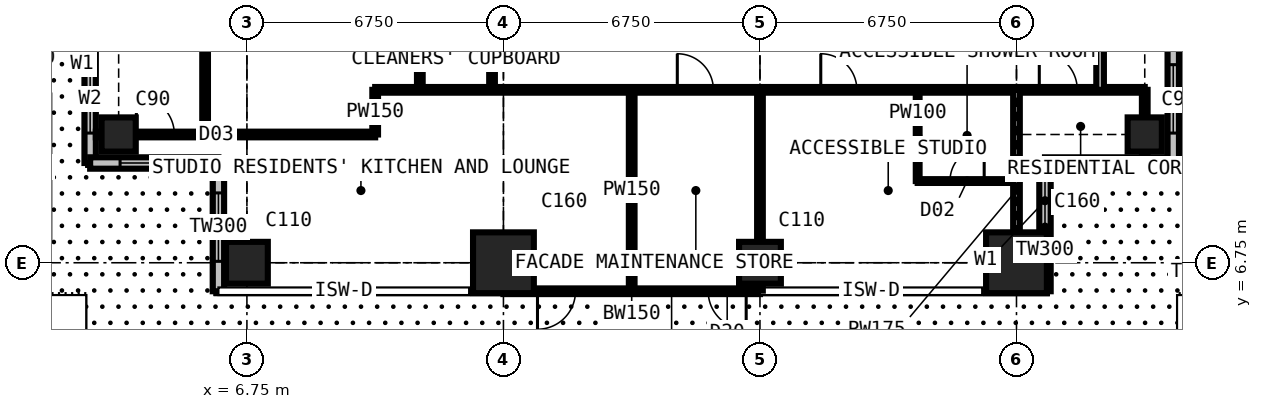
"""IFC4 building model, lengths in metres.
Left out: names, types, materials, properties, quantities, classifications, styles, units other than length and angle.
Written with IfcOpenShell. Run it as: python <this file> out.ifc"""

import sys

from ifc_helpers import new_model, si_unit, direction, frame, frame_2d, origin, origin_2d, place, context, subcontext, project, spatial, rectangle, extrude, element, fill, save


model = new_model("IFC4")
c1 = context("Model", 3, precision=1e-05, world=origin(), true_north=direction((0.0, 1.0)))
c2 = subcontext(c1, "Body", "Model", "MODEL_VIEW")
j1 = project(units=[si_unit("LENGTHUNIT", "METRE"), si_unit("PLANEANGLEUNIT", "RADIAN")], contexts=[c1])
p1 = place(None, origin())
s1 = spatial("IfcSite", under=j1, at=p1, CompositionType="ELEMENT")
p2 = place(p1, origin())
s2 = spatial("IfcBuilding", under=s1, at=p2, CompositionType="ELEMENT")
p3 = place(p2, frame((0.0, 0.0, 204.3)))
s3 = spatial("IfcBuildingStorey", under=s2, at=p3, CompositionType="ELEMENT", Elevation=204.3)
p4 = place(p3, frame((3.375, 10.125, 0.0), z_axis=(0.0, 0.0, 1.0), x_axis=(1.0, 0.0, 0.0)))
e1 = element("IfcColumn", 1, at=p4, inside=s3, PredefinedType="COLUMN", context=c2, shape_type="SweptSolid", body=[
    extrude(rectangle(XDim=0.9, YDim=0.9, at=origin_2d()), origin(), (0.0, 0.0, 1.0), 3.6),
])
p5 = place(p3, frame((6.75, 6.75, 0.0), z_axis=(0.0, 0.0, 1.0), x_axis=(1.0, 0.0, 0.0)))
e2 = element("IfcColumn", 2, at=p5, inside=s3, PredefinedType="COLUMN", context=c2, shape_type="SweptSolid", body=[
    extrude(rectangle(XDim=1.1, YDim=1.1, at=origin_2d()), origin(), (0.0, 0.0, 1.0), 3.6),
])
p6 = place(p3, frame((13.5, 6.75, 0.0), z_axis=(0.0, 0.0, 1.0), x_axis=(1.0, 0.0, 0.0)))
e3 = element("IfcColumn", 3, at=p6, inside=s3, PredefinedType="COLUMN", context=c2, shape_type="SweptSolid", body=[
    extrude(rectangle(XDim=1.6, YDim=1.6, at=origin_2d()), origin(), (0.0, 0.0, 1.0), 3.6),
])
p7 = place(p3, frame((20.25, 6.75, 0.0), z_axis=(0.0, 0.0, 1.0), x_axis=(1.0, 0.0, 0.0)))
e4 = element("IfcColumn", 4, at=p7, inside=s3, PredefinedType="COLUMN", context=c2, shape_type="SweptSolid", body=[
    extrude(rectangle(XDim=1.1, YDim=1.1, at=origin_2d()), origin(), (0.0, 0.0, 1.0), 3.6),
])
p8 = place(p3, frame((27.0, 6.75, 0.0), z_axis=(0.0, 0.0, 1.0), x_axis=(1.0, 0.0, 0.0)))
e5 = element("IfcColumn", 5, at=p8, inside=s3, PredefinedType="COLUMN", context=c2, shape_type="SweptSolid", body=[
    extrude(rectangle(XDim=1.6, YDim=1.6, at=origin_2d()), origin(), (0.0, 0.0, 1.0), 3.6),
])
p9 = place(p3, frame((30.375, 10.125, 0.0), z_axis=(0.0, 0.0, 1.0), x_axis=(1.0, 0.0, 0.0)))
e6 = element("IfcColumn", 6, at=p9, inside=s3, PredefinedType="COLUMN", context=c2, shape_type="SweptSolid", body=[
    extrude(rectangle(XDim=0.9, YDim=0.9, at=origin_2d()), origin(), (0.0, 0.0, 1.0), 3.6),
])
p10 = place(p3, frame((2.625, 12.75, 0.0), z_axis=(0.0, 0.0, 1.0), x_axis=(0.0, -1.0, 0.0)))
e7 = element("IfcWall", 7, at=p10, inside=s3, PredefinedType="SOLIDWALL", context=c2, shape_type="SweptSolid", body=[
    extrude(rectangle(XDim=3.375, YDim=0.3, at=frame_2d((1.688, 0.0))), origin(), (0.0, 0.0, 1.0), 3.375),
])
p11 = place(p10, frame((0.788, 0.0, 0.6)))
e8 = element("IfcOpeningElement", 8, at=p11, cuts=e7, PredefinedType="OPENING", context=c2, shape_type="SweptSolid", body=[
    extrude(rectangle(XDim=1.8, YDim=2.1, at=frame_2d((0.9, 1.05))), frame((0.0, 0.16, 0.0), z_axis=(0.0, -1.0, 0.0), x_axis=(1.0, 0.0, 0.0)), (0.0, 0.0, 1.0), 0.32),
])
p12 = place(p3, frame((2.625, 9.375, 0.0), z_axis=(0.0, 0.0, 1.0), x_axis=(1.0, 0.0, 0.0)))
e9 = element("IfcWall", 9, at=p12, inside=s3, PredefinedType="SOLIDWALL", context=c2, shape_type="SweptSolid", body=[
    extrude(rectangle(XDim=3.375, YDim=0.3, at=frame_2d((1.688, 0.0))), origin(), (0.0, 0.0, 1.0), 3.375),
])
p13 = place(p12, frame((0.788, 0.0, 0.6)))
e10 = element("IfcOpeningElement", 10, at=p13, cuts=e9, PredefinedType="OPENING", context=c2, shape_type="SweptSolid", body=[
    extrude(rectangle(XDim=1.8, YDim=2.1, at=frame_2d((0.9, 1.05))), frame((0.0, 0.16, 0.0), z_axis=(0.0, -1.0, 0.0), x_axis=(1.0, 0.0, 0.0)), (0.0, 0.0, 1.0), 0.32),
])
p14 = place(p3, frame((6.0, 9.375, 0.0), z_axis=(0.0, 0.0, 1.0), x_axis=(0.0, -1.0, 0.0)))
e11 = element("IfcWall", 11, at=p14, inside=s3, PredefinedType="SOLIDWALL", context=c2, shape_type="SweptSolid", body=[
    extrude(rectangle(XDim=3.375, YDim=0.3, at=frame_2d((1.688, 0.0))), origin(), (0.0, 0.0, 1.0), 3.375),
])
p15 = place(p14, frame((0.788, 0.0, 0.6)))
e12 = element("IfcOpeningElement", 12, at=p15, cuts=e11, PredefinedType="OPENING", context=c2, shape_type="SweptSolid", body=[
    extrude(rectangle(XDim=1.8, YDim=2.1, at=frame_2d((0.9, 1.05))), frame((0.0, 0.16, 0.0), z_axis=(0.0, -1.0, 0.0), x_axis=(1.0, 0.0, 0.0)), (0.0, 0.0, 1.0), 0.32),
])
p16 = place(p3, frame((20.25, 6.0, 0.0), z_axis=(0.0, 0.0, 1.0), x_axis=(-1.0, 0.0, 0.0)))
e13 = element("IfcWall", 13, at=p16, inside=s3, PredefinedType="SOLIDWALL", context=c2, shape_type="SweptSolid", body=[
    extrude(rectangle(XDim=6.75, YDim=0.15, at=frame_2d((3.375, 0.0))), origin(), (0.0, 0.0, 1.0), 3.375),
])
p17 = place(p16, frame((0.363, 0.0, 0.0)))
e14 = element("IfcOpeningElement", 14, at=p17, cuts=e13, PredefinedType="OPENING", context=c2, shape_type="SweptSolid", body=[
    extrude(rectangle(XDim=1.0, YDim=2.2, at=frame_2d((0.5, 1.1))), frame((0.0, 0.085, 0.0), z_axis=(0.0, -1.0, 0.0), x_axis=(1.0, 0.0, 0.0)), (0.0, 0.0, 1.0), 0.17),
])
p18 = place(p16, frame((1.725, 0.0, 0.9)))
e15 = element("IfcOpeningElement", 15, at=p18, cuts=e13, PredefinedType="OPENING", context=c2, shape_type="SweptSolid", body=[
    extrude(rectangle(XDim=1.2, YDim=1.8, at=frame_2d((0.6, 0.9))), frame((0.0, 0.085, 0.0), z_axis=(0.0, -1.0, 0.0), x_axis=(1.0, 0.0, 0.0)), (0.0, 0.0, 1.0), 0.17),
])
p19 = place(p16, frame((4.854, 0.0, 0.0)))
e16 = element("IfcOpeningElement", 16, at=p19, cuts=e13, PredefinedType="OPENING", context=c2, shape_type="SweptSolid", body=[
    extrude(rectangle(XDim=1.0, YDim=2.2, at=frame_2d((0.5, 1.1))), frame((0.0, 0.085, 0.0), z_axis=(0.0, -1.0, 0.0), x_axis=(1.0, 0.0, 0.0)), (0.0, 0.0, 1.0), 0.17),
])
p20 = place(p16, frame((3.558, 0.0, 0.9)))
e17 = element("IfcOpeningElement", 17, at=p20, cuts=e13, PredefinedType="OPENING", context=c2, shape_type="SweptSolid", body=[
    extrude(rectangle(XDim=1.2, YDim=1.8, at=frame_2d((0.6, 0.9))), frame((0.0, 0.085, 0.0), z_axis=(0.0, -1.0, 0.0), x_axis=(1.0, 0.0, 0.0)), (0.0, 0.0, 1.0), 0.17),
])
p21 = place(p3, frame((27.75, 6.0, 0.0), z_axis=(0.0, 0.0, 1.0), x_axis=(0.0, 1.0, 0.0)))
e18 = element("IfcWall", 18, at=p21, inside=s3, PredefinedType="SOLIDWALL", context=c2, shape_type="SweptSolid", body=[
    extrude(rectangle(XDim=3.375, YDim=0.3, at=frame_2d((1.688, 0.0))), origin(), (0.0, 0.0, 1.0), 3.375),
])
p22 = place(p21, frame((1.633, 0.0, 0.9)))
e19 = element("IfcOpeningElement", 19, at=p22, cuts=e18, PredefinedType="OPENING", context=c2, shape_type="SweptSolid", body=[
    extrude(rectangle(XDim=1.5, YDim=1.8, at=frame_2d((0.75, 0.9))), frame((0.0, 0.16, 0.0), z_axis=(0.0, -1.0, 0.0), x_axis=(1.0, 0.0, 0.0)), (0.0, 0.0, 1.0), 0.32),
])
p23 = place(p3, frame((27.75, 9.375, 0.0), z_axis=(0.0, 0.0, 1.0), x_axis=(1.0, 0.0, 0.0)))
e20 = element("IfcWall", 20, at=p23, inside=s3, PredefinedType="SOLIDWALL", context=c2, shape_type="SweptSolid", body=[
    extrude(rectangle(XDim=3.375, YDim=0.3, at=frame_2d((1.688, 0.0))), origin(), (0.0, 0.0, 1.0), 3.375),
])
p24 = place(p23, frame((0.788, 0.0, 0.6)))
e21 = element("IfcOpeningElement", 21, at=p24, cuts=e20, PredefinedType="OPENING", context=c2, shape_type="SweptSolid", body=[
    extrude(rectangle(XDim=1.8, YDim=2.1, at=frame_2d((0.9, 1.05))), frame((0.0, 0.16, 0.0), z_axis=(0.0, -1.0, 0.0), x_axis=(1.0, 0.0, 0.0)), (0.0, 0.0, 1.0), 0.32),
])
p25 = place(p3, frame((31.125, 9.375, 0.0), z_axis=(0.0, 0.0, 1.0), x_axis=(0.0, 1.0, 0.0)))
e22 = element("IfcWall", 22, at=p25, inside=s3, PredefinedType="SOLIDWALL", context=c2, shape_type="SweptSolid", body=[
    extrude(rectangle(XDim=3.375, YDim=0.3, at=frame_2d((1.688, 0.0))), origin(), (0.0, 0.0, 1.0), 3.375),
])
p26 = place(p25, frame((0.788, 0.0, 0.6)))
e23 = element("IfcOpeningElement", 23, at=p26, cuts=e22, PredefinedType="OPENING", context=c2, shape_type="SweptSolid", body=[
    extrude(rectangle(XDim=1.8, YDim=2.1, at=frame_2d((0.9, 1.05))), frame((0.0, 0.16, 0.0), z_axis=(0.0, -1.0, 0.0), x_axis=(1.0, 0.0, 0.0)), (0.0, 0.0, 1.0), 0.32),
])
p27 = place(p3, frame((2.775, 10.125, 0.0), z_axis=(0.0, 0.0, 1.0), x_axis=(1.0, 0.0, 0.0)))
e24 = element("IfcWall", 24, at=p27, inside=s3, PredefinedType="PARTITIONING", context=c2, shape_type="SweptSolid", body=[
    extrude(rectangle(XDim=7.35, YDim=0.15, at=frame_2d((3.675, 0.0))), origin(), (0.0, 0.0, 1.0), 2.877),
])
p28 = place(p27, frame((1.066, 0.0, 0.0)))
e25 = element("IfcOpeningElement", 25, at=p28, cuts=e24, PredefinedType="OPENING", context=c2, shape_type="SweptSolid", body=[
    extrude(rectangle(XDim=1.0, YDim=2.2, at=frame_2d((0.5, 1.1))), frame((0.0, 0.085, 0.0), z_axis=(0.0, -1.0, 0.0), x_axis=(1.0, 0.0, 0.0)), (0.0, 0.0, 1.0), 0.17),
])
p29 = place(p3, frame((5.65, 10.125, 0.0), z_axis=(0.0, 0.0, 1.0), x_axis=(0.0, 1.0, 0.0)))
e26 = element("IfcWall", 26, at=p29, inside=s3, PredefinedType="PARTITIONING", context=c2, shape_type="SweptSolid", body=[
    extrude(rectangle(XDim=10.762, YDim=0.15, at=frame_2d((5.381, 0.0))), origin(), (0.0, 0.0, 1.0), 3.375),
])
p30 = place(p29, frame((4.9, 0.0, 0.0)))
e27 = element("IfcOpeningElement", 27, at=p30, cuts=e26, PredefinedType="OPENING", context=c2, shape_type="SweptSolid", body=[
    extrude(rectangle(XDim=0.95, YDim=2.2, at=frame_2d((0.475, 1.1))), frame((0.0, 0.085, 0.0), z_axis=(0.0, -1.0, 0.0), x_axis=(1.0, 0.0, 0.0)), (0.0, 0.0, 1.0), 0.17),
])
p31 = place(p3, frame((10.125, 10.125, 0.0), z_axis=(0.0, 0.0, 1.0), x_axis=(0.0, 1.0, 0.0)))
e28 = element("IfcWall", 28, at=p31, inside=s3, PredefinedType="PARTITIONING", context=c2, shape_type="SweptSolid", body=[
    extrude(rectangle(XDim=1.175, YDim=0.15, at=frame_2d((0.587, 0.0))), origin(), (0.0, 0.0, 1.0), 3.375),
])
p32 = place(p3, frame((10.125, 11.3, 0.0), z_axis=(0.0, 0.0, 1.0), x_axis=(1.0, 0.0, 0.0)))
e29 = element("IfcWall", 29, at=p32, inside=s3, PredefinedType="PARTITIONING", context=c2, shape_type="SweptSolid", body=[
    extrude(rectangle(XDim=20.25, YDim=0.15, at=frame_2d((10.125, 0.0))), origin(), (0.0, 0.0, 1.0), 3.375),
])
p33 = place(p32, frame((11.725, 0.0, 0.0)))
e30 = element("IfcOpeningElement", 30, at=p33, cuts=e29, PredefinedType="OPENING", context=c2, shape_type="SweptSolid", body=[
    extrude(rectangle(XDim=0.95, YDim=2.2, at=frame_2d((0.475, 1.1))), frame((0.0, 0.085, 0.0), z_axis=(0.0, -1.0, 0.0), x_axis=(1.0, 0.0, 0.0)), (0.0, 0.0, 1.0), 0.17),
])
p34 = place(p32, frame((17.475, 0.0, 0.0)))
e31 = element("IfcOpeningElement", 31, at=p34, cuts=e29, PredefinedType="OPENING", context=c2, shape_type="SweptSolid", body=[
    extrude(rectangle(XDim=1.0, YDim=2.2, at=frame_2d((0.5, 1.1))), frame((0.0, 0.085, 0.0), z_axis=(0.0, -1.0, 0.0), x_axis=(1.0, 0.0, 0.0)), (0.0, 0.0, 1.0), 0.17),
])
p35 = place(p32, frame((7.95, 0.0, 0.0)))
e32 = element("IfcOpeningElement", 32, at=p35, cuts=e29, PredefinedType="OPENING", context=c2, shape_type="SweptSolid", body=[
    extrude(rectangle(XDim=0.95, YDim=2.2, at=frame_2d((0.475, 1.1))), frame((0.0, 0.085, 0.0), z_axis=(0.0, -1.0, 0.0), x_axis=(1.0, 0.0, 0.0)), (0.0, 0.0, 1.0), 0.17),
])
p36 = place(p3, frame((11.3, 11.3, 0.0), z_axis=(0.0, 0.0, 1.0), x_axis=(0.0, 1.0, 0.0)))
e33 = element("IfcWall", 33, at=p36, inside=s3, PredefinedType="PARTITIONING", context=c2, shape_type="SweptSolid", body=[
    extrude(rectangle(XDim=19.3, YDim=0.15, at=frame_2d((9.65, 0.0))), origin(), (0.0, 0.0, 1.0), 3.375),
])
p37 = place(p36, frame((18.1, 0.0, 0.0)))
e34 = element("IfcOpeningElement", 34, at=p37, cuts=e33, PredefinedType="OPENING", context=c2, shape_type="SweptSolid", body=[
    extrude(rectangle(XDim=1.0, YDim=2.2, at=frame_2d((0.5, 1.1))), frame((0.0, 0.085, 0.0), z_axis=(0.0, -1.0, 0.0), x_axis=(1.0, 0.0, 0.0)), (0.0, 0.0, 1.0), 0.17),
])
p38 = place(p36, frame((10.137, 0.0, 0.0)))
e35 = element("IfcOpeningElement", 35, at=p38, cuts=e33, PredefinedType="OPENING", context=c2, shape_type="SweptSolid", body=[
    extrude(rectangle(XDim=1.0, YDim=2.2, at=frame_2d((0.5, 1.1))), frame((0.0, 0.085, 0.0), z_axis=(0.0, -1.0, 0.0), x_axis=(1.0, 0.0, 0.0)), (0.0, 0.0, 1.0), 0.17),
])
p39 = place(p3, frame((13.2, 11.3, 0.0), z_axis=(0.0, 0.0, 1.0), x_axis=(0.0, 1.0, 0.0)))
e36 = element("IfcWall", 36, at=p39, inside=s3, PredefinedType="PARTITIONING", context=c2, shape_type="SweptSolid", body=[
    extrude(rectangle(XDim=1.6, YDim=0.15, at=frame_2d((0.8, 0.0))), origin(), (0.0, 0.0, 1.0), 3.375),
])
p40 = place(p3, frame((16.875, 6.016, 0.0), z_axis=(0.0, 0.0, 1.0), x_axis=(0.0, 1.0, 0.0)))
e37 = element("IfcWall", 37, at=p40, inside=s3, PredefinedType="PARTITIONING", context=c2, shape_type="SweptSolid", body=[
    extrude(rectangle(XDim=5.284, YDim=0.15, at=frame_2d((2.642, 0.0))), origin(), (0.0, 0.0, 1.0), 3.375),
])
p41 = place(p3, frame((20.25, 6.016, 0.0), z_axis=(0.0, 0.0, 1.0), x_axis=(0.0, 1.0, 0.0)))
e38 = element("IfcWall", 38, at=p41, inside=s3, PredefinedType="PARTITIONING", context=c2, shape_type="SweptSolid", body=[
    extrude(rectangle(XDim=5.284, YDim=0.15, at=frame_2d((2.642, 0.0))), origin(), (0.0, 0.0, 1.0), 2.806),
])
p42 = place(p3, frame((24.4, 8.9, 0.0), z_axis=(0.0, 0.0, 1.0), x_axis=(0.0, 1.0, 0.0)))
e39 = element("IfcWall", 39, at=p42, inside=s3, PredefinedType="PARTITIONING", context=c2, shape_type="SweptSolid", body=[
    extrude(rectangle(XDim=2.4, YDim=0.1, at=frame_2d((1.2, 0.0))), origin(), (0.0, 0.0, 1.0), 3.375),
])
p43 = place(p3, frame((24.4, 8.9, 0.0), z_axis=(0.0, 0.0, 1.0), x_axis=(1.0, 0.0, 0.0)))
e40 = element("IfcWall", 40, at=p43, inside=s3, PredefinedType="PARTITIONING", context=c2, shape_type="SweptSolid", body=[
    extrude(rectangle(XDim=2.6, YDim=0.1, at=frame_2d((1.3, 0.0))), origin(), (0.0, 0.0, 1.0), 3.375),
])
p44 = place(p43, frame((0.85, 0.0, 0.0)))
e41 = element("IfcOpeningElement", 41, at=p44, cuts=e40, PredefinedType="OPENING", context=c2, shape_type="SweptSolid", body=[
    extrude(rectangle(XDim=0.9, YDim=2.2, at=frame_2d((0.45, 1.1))), frame((0.0, 0.06, 0.0), z_axis=(0.0, -1.0, 0.0), x_axis=(1.0, 0.0, 0.0)), (0.0, 0.0, 1.0), 0.12),
])
p45 = place(p3, frame((27.0, 6.016, 0.0), z_axis=(0.0, 0.0, 1.0), x_axis=(0.0, 1.0, 0.0)))
e42 = element("IfcWall", 42, at=p45, inside=s3, PredefinedType="PARTITIONING", context=c2, shape_type="SweptSolid", body=[
    extrude(rectangle(XDim=5.284, YDim=0.175, at=frame_2d((2.642, 0.0))), origin(), (0.0, 0.0, 1.0), 2.806),
])
p46 = place(p3, frame((27.0, 9.375, 0.0), z_axis=(0.0, 0.0, 1.0), x_axis=(1.0, 0.0, 0.0)))
e43 = element("IfcWall", 43, at=p46, inside=s3, PredefinedType="PARTITIONING", context=c2, shape_type="SweptSolid", body=[
    extrude(rectangle(XDim=0.734, YDim=0.15, at=frame_2d((0.367, 0.0))), origin(), (0.0, 0.0, 1.0), 3.375),
])
p47 = place(p3, frame((29.2, 11.3, 0.0), z_axis=(0.0, 0.0, 1.0), x_axis=(0.0, 1.0, 0.0)))
e44 = element("IfcWall", 44, at=p47, inside=s3, PredefinedType="PARTITIONING", context=c2, shape_type="SweptSolid", body=[
    extrude(rectangle(XDim=17.9, YDim=0.2, at=frame_2d((8.95, 0.0))), origin(), (0.0, 0.0, 1.0), 3.375),
])
p48 = place(p47, frame((2.3, 0.0, 0.0)))
e45 = element("IfcOpeningElement", 45, at=p48, cuts=e44, PredefinedType="OPENING", context=c2, shape_type="SweptSolid", body=[
    extrude(rectangle(XDim=1.0, YDim=2.2, at=frame_2d((0.5, 1.1))), frame((0.0, 0.11, 0.0), z_axis=(0.0, -1.0, 0.0), x_axis=(1.0, 0.0, 0.0)), (0.0, 0.0, 1.0), 0.22),
])
p49 = place(p47, frame((10.55, 0.0, 0.0)))
e46 = element("IfcOpeningElement", 46, at=p49, cuts=e44, PredefinedType="OPENING", context=c2, shape_type="SweptSolid", body=[
    extrude(rectangle(XDim=0.95, YDim=2.2, at=frame_2d((0.475, 1.1))), frame((0.0, 0.11, 0.0), z_axis=(0.0, -1.0, 0.0), x_axis=(1.0, 0.0, 0.0)), (0.0, 0.0, 1.0), 0.22),
])
p50 = place(p47, frame((5.775, 0.0, 0.0)))
e47 = element("IfcOpeningElement", 47, at=p50, cuts=e44, PredefinedType="OPENING", context=c2, shape_type="SweptSolid", body=[
    extrude(rectangle(XDim=0.95, YDim=2.2, at=frame_2d((0.475, 1.1))), frame((0.0, 0.11, 0.0), z_axis=(0.0, -1.0, 0.0), x_axis=(1.0, 0.0, 0.0)), (0.0, 0.0, 1.0), 0.22),
])
p51 = place(p47, frame((16.3, 0.0, 0.0)))
e48 = element("IfcOpeningElement", 48, at=p51, cuts=e44, PredefinedType="OPENING", context=c2, shape_type="SweptSolid", body=[
    extrude(rectangle(XDim=1.0, YDim=2.2, at=frame_2d((0.5, 1.1))), frame((0.0, 0.11, 0.0), z_axis=(0.0, -1.0, 0.0), x_axis=(1.0, 0.0, 0.0)), (0.0, 0.0, 1.0), 0.22),
])
p52 = place(p3, frame((30.375, 9.525, 0.0), z_axis=(0.0, 0.0, 1.0), x_axis=(0.0, 1.0, 0.0)))
e49 = element("IfcWall", 49, at=p52, inside=s3, PredefinedType="PARTITIONING", context=c2, shape_type="SweptSolid", body=[
    extrude(rectangle(XDim=1.775, YDim=0.15, at=frame_2d((0.888, 0.0))), origin(), (0.0, 0.0, 1.0), 2.877),
])
p53 = place(p11, origin())
e50 = element("IfcWindow", 50, at=p53, inside=s3, PartitioningType="SINGLE_PANEL", PredefinedType="WINDOW", context=c2, shape_type="SweptSolid", body=[
    extrude(rectangle(XDim=1.8, YDim=2.1, at=frame_2d((0.9, 1.05))), frame((0.0, 0.03, 0.0), z_axis=(0.0, -1.0, 0.0), x_axis=(1.0, 0.0, 0.0)), (0.0, 0.0, 1.0), 0.06),
])
fill(e8, e50)
p54 = place(p13, origin())
e51 = element("IfcWindow", 51, at=p54, inside=s3, PartitioningType="SINGLE_PANEL", PredefinedType="WINDOW", context=c2, shape_type="SweptSolid", body=[
    extrude(rectangle(XDim=1.8, YDim=2.1, at=frame_2d((0.9, 1.05))), frame((0.0, 0.03, 0.0), z_axis=(0.0, -1.0, 0.0), x_axis=(1.0, 0.0, 0.0)), (0.0, 0.0, 1.0), 0.06),
])
fill(e10, e51)
p55 = place(p15, origin())
e52 = element("IfcWindow", 52, at=p55, inside=s3, PartitioningType="SINGLE_PANEL", PredefinedType="WINDOW", context=c2, shape_type="SweptSolid", body=[
    extrude(rectangle(XDim=1.8, YDim=2.1, at=frame_2d((0.9, 1.05))), frame((0.0, 0.03, 0.0), z_axis=(0.0, -1.0, 0.0), x_axis=(1.0, 0.0, 0.0)), (0.0, 0.0, 1.0), 0.06),
])
fill(e12, e52)
p56 = place(p17, origin())
e53 = element("IfcDoor", 53, at=p56, inside=s3, OperationType="SINGLE_SWING_LEFT", PredefinedType="DOOR", context=c2, shape_type="SweptSolid", body=[
    extrude(rectangle(XDim=1.0, YDim=2.2, at=frame_2d((0.5, 1.1))), frame((0.0, 0.025, 0.0), z_axis=(0.0, -1.0, 0.0), x_axis=(1.0, 0.0, 0.0)), (0.0, 0.0, 1.0), 0.05),
])
fill(e14, e53)
p57 = place(p18, origin())
e54 = element("IfcWindow", 54, at=p57, inside=s3, PartitioningType="SINGLE_PANEL", PredefinedType="WINDOW", context=c2, shape_type="SweptSolid", body=[
    extrude(rectangle(XDim=1.2, YDim=1.8, at=frame_2d((0.6, 0.9))), frame((0.0, 0.03, 0.0), z_axis=(0.0, -1.0, 0.0), x_axis=(1.0, 0.0, 0.0)), (0.0, 0.0, 1.0), 0.06),
])
fill(e15, e54)
p58 = place(p19, origin())
e55 = element("IfcDoor", 55, at=p58, inside=s3, OperationType="SINGLE_SWING_RIGHT", PredefinedType="DOOR", context=c2, shape_type="SweptSolid", body=[
    extrude(rectangle(XDim=1.0, YDim=2.2, at=frame_2d((0.5, 1.1))), frame((0.0, 0.025, 0.0), z_axis=(0.0, -1.0, 0.0), x_axis=(1.0, 0.0, 0.0)), (0.0, 0.0, 1.0), 0.05),
])
fill(e16, e55)
p59 = place(p20, origin())
e56 = element("IfcWindow", 56, at=p59, inside=s3, PartitioningType="SINGLE_PANEL", PredefinedType="WINDOW", context=c2, shape_type="SweptSolid", body=[
    extrude(rectangle(XDim=1.2, YDim=1.8, at=frame_2d((0.6, 0.9))), frame((0.0, 0.03, 0.0), z_axis=(0.0, -1.0, 0.0), x_axis=(1.0, 0.0, 0.0)), (0.0, 0.0, 1.0), 0.06),
])
fill(e17, e56)
p60 = place(p22, origin())
e57 = element("IfcWindow", 57, at=p60, inside=s3, PartitioningType="SINGLE_PANEL", PredefinedType="WINDOW", context=c2, shape_type="SweptSolid", body=[
    extrude(rectangle(XDim=1.5, YDim=1.8, at=frame_2d((0.75, 0.9))), frame((0.0, 0.03, 0.0), z_axis=(0.0, -1.0, 0.0), x_axis=(1.0, 0.0, 0.0)), (0.0, 0.0, 1.0), 0.06),
])
fill(e19, e57)
p61 = place(p24, origin())
e58 = element("IfcWindow", 58, at=p61, inside=s3, PartitioningType="SINGLE_PANEL", PredefinedType="WINDOW", context=c2, shape_type="SweptSolid", body=[
    extrude(rectangle(XDim=1.8, YDim=2.1, at=frame_2d((0.9, 1.05))), frame((0.0, 0.03, 0.0), z_axis=(0.0, -1.0, 0.0), x_axis=(1.0, 0.0, 0.0)), (0.0, 0.0, 1.0), 0.06),
])
fill(e21, e58)
p62 = place(p26, origin())
e59 = element("IfcWindow", 59, at=p62, inside=s3, PartitioningType="SINGLE_PANEL", PredefinedType="WINDOW", context=c2, shape_type="SweptSolid", body=[
    extrude(rectangle(XDim=1.8, YDim=2.1, at=frame_2d((0.9, 1.05))), frame((0.0, 0.03, 0.0), z_axis=(0.0, -1.0, 0.0), x_axis=(1.0, 0.0, 0.0)), (0.0, 0.0, 1.0), 0.06),
])
fill(e23, e59)
p63 = place(p28, origin())
e60 = element("IfcDoor", 60, at=p63, inside=s3, OperationType="SINGLE_SWING_LEFT", PredefinedType="DOOR", context=c2, shape_type="SweptSolid", body=[
    extrude(rectangle(XDim=1.0, YDim=2.2, at=frame_2d((0.5, 1.1))), frame((0.0, 0.025, 0.0), z_axis=(0.0, -1.0, 0.0), x_axis=(1.0, 0.0, 0.0)), (0.0, 0.0, 1.0), 0.05),
])
fill(e25, e60)
p64 = place(p33, origin())
e61 = element("IfcDoor", 61, at=p64, inside=s3, OperationType="SINGLE_SWING_LEFT", PredefinedType="DOOR", context=c2, shape_type="SweptSolid", body=[
    extrude(rectangle(XDim=0.95, YDim=2.2, at=frame_2d((0.475, 1.1))), frame((0.0, 0.025, 0.0), z_axis=(0.0, -1.0, 0.0), x_axis=(1.0, 0.0, 0.0)), (0.0, 0.0, 1.0), 0.05),
])
fill(e30, e61)
p65 = place(p44, origin())
e62 = element("IfcDoor", 62, at=p65, inside=s3, OperationType="SINGLE_SWING_RIGHT", PredefinedType="DOOR", context=c2, shape_type="SweptSolid", body=[
    extrude(rectangle(XDim=0.9, YDim=2.2, at=frame_2d((0.45, 1.1))), frame((0.0, 0.025, 0.0), z_axis=(0.0, -1.0, 0.0), x_axis=(1.0, 0.0, 0.0)), (0.0, 0.0, 1.0), 0.05),
])
fill(e41, e62)
p66 = place(p34, origin())
e63 = element("IfcDoor", 63, at=p66, inside=s3, OperationType="SINGLE_SWING_LEFT", PredefinedType="DOOR", context=c2, shape_type="SweptSolid", body=[
    extrude(rectangle(XDim=1.0, YDim=2.2, at=frame_2d((0.5, 1.1))), frame((0.0, 0.025, 0.0), z_axis=(0.0, -1.0, 0.0), x_axis=(1.0, 0.0, 0.0)), (0.0, 0.0, 1.0), 0.05),
])
fill(e31, e63)
p67 = place(p35, origin())
e64 = element("IfcDoor", 64, at=p67, inside=s3, OperationType="SINGLE_SWING_LEFT", PredefinedType="DOOR", context=c2, shape_type="SweptSolid", body=[
    extrude(rectangle(XDim=0.95, YDim=2.2, at=frame_2d((0.475, 1.1))), frame((0.0, 0.025, 0.0), z_axis=(0.0, -1.0, 0.0), x_axis=(1.0, 0.0, 0.0)), (0.0, 0.0, 1.0), 0.05),
])
fill(e32, e64)
save(model, sys.argv[1])
